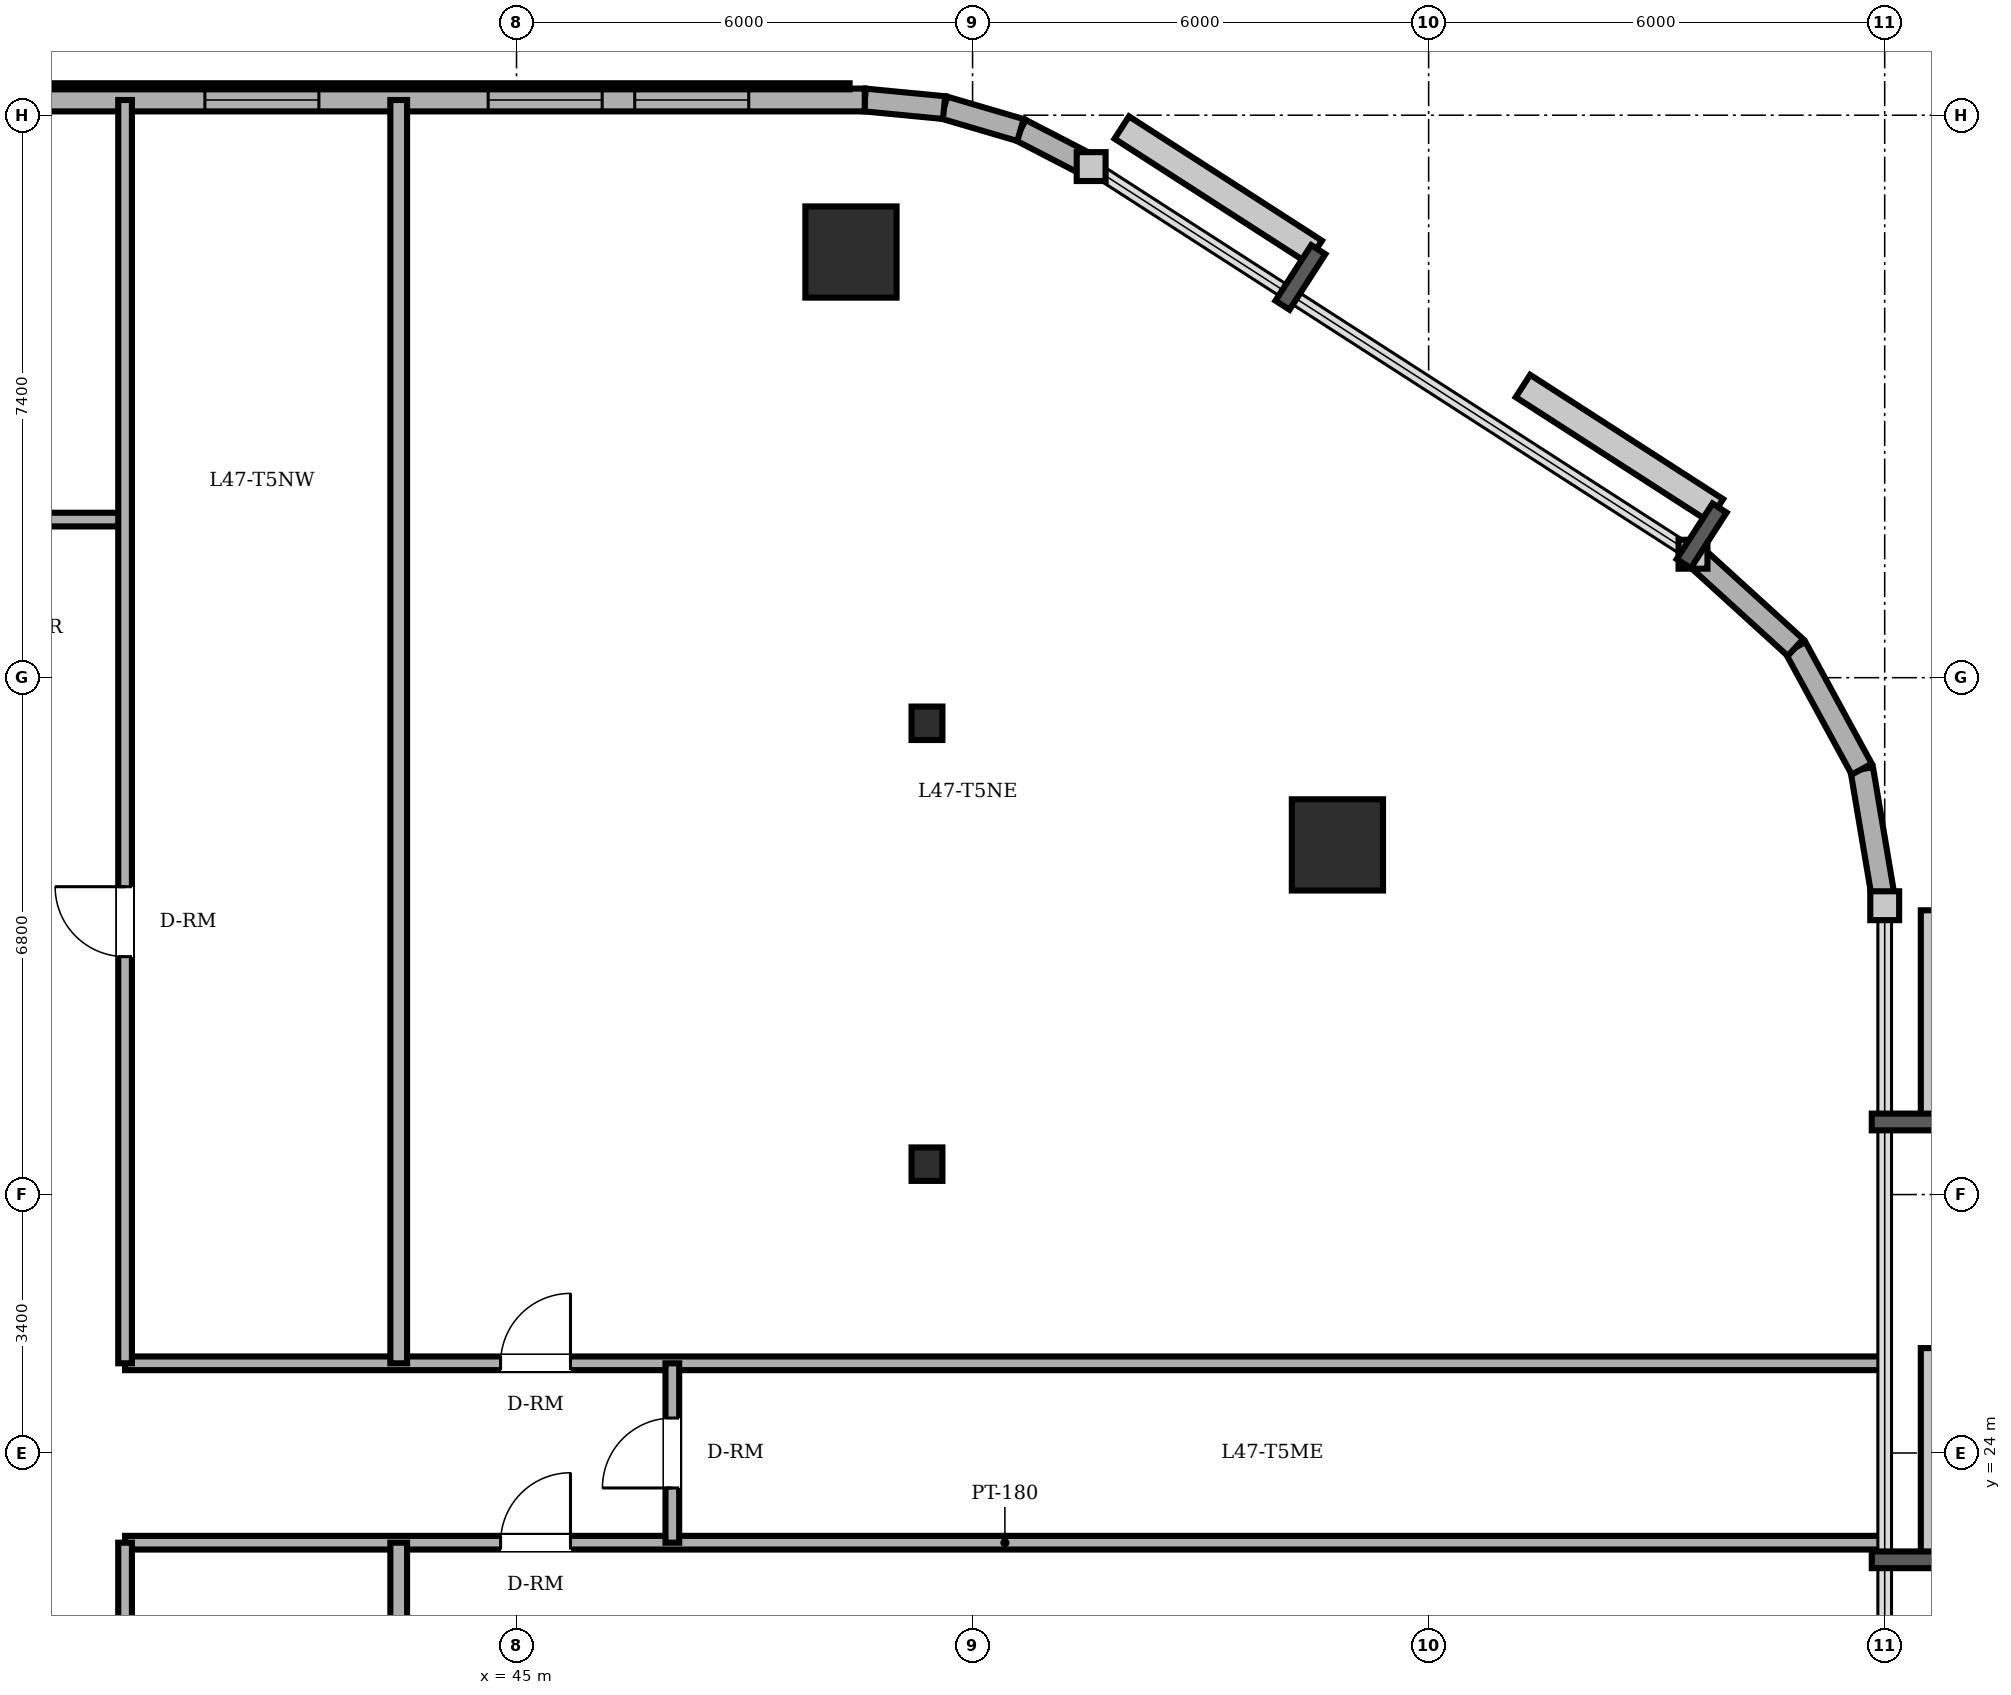
"""IFC4 building model, lengths in metres.
Left out: names, types, materials, properties, quantities, classifications, styles, units other than length and angle.
Written with IfcOpenShell. Run it as: python <this file> out.ifc"""

import sys

from ifc_helpers import new_model, si_unit, direction, frame, frame_2d, origin, origin_2d, place, context, subcontext, project, spatial, rectangle, circle, i_section, extrude, element, fill, save


model = new_model("IFC4")
c1 = context("Model", 3, precision=1e-05, world=origin(), true_north=direction((0.0, 1.0)))
c2 = subcontext(c1, "Body", "Model", "MODEL_VIEW")
j1 = project(units=[si_unit("LENGTHUNIT", "METRE"), si_unit("PLANEANGLEUNIT", "RADIAN")], contexts=[c1])
p1 = place(None, origin())
s1 = spatial("IfcSite", under=j1, at=p1, CompositionType="ELEMENT")
p2 = place(p1, origin())
s2 = spatial("IfcBuilding", under=s1, at=p2, CompositionType="ELEMENT")
p3 = place(p2, frame((0.0, 0.0, 179.8)))
s3 = spatial("IfcBuildingStorey", under=s2, at=p3, CompositionType="ELEMENT", Elevation=179.8)
for number, where, z_axis, x_axis in (
    (1, (55.8, 32.0, 0.0), (0.0, 0.0, 1.0), (1.0, 0.0, 0.0)),
    (2, (49.4, 39.8, 0.0), (0.0, 0.0, 1.0), (1.0, 0.0, 0.0)),
):
    element("IfcColumn", number, at=place(p3, frame(where, z_axis=z_axis, x_axis=x_axis)), inside=s3, PredefinedType="COLUMN", context=c2, shape_type="SweptSolid", body=[
        extrude(circle(Radius=0.6, at=origin_2d()), origin(), (0.0, 0.0, 1.0), 3.6),
    ])
for number, where, z_axis, x_axis in (
    (3, (50.4, 27.8, 0.0), (0.0, 0.0, 1.0), (1.0, 0.0, 0.0)),
    (4, (50.4, 33.6, 0.0), (0.0, 0.0, 1.0), (1.0, 0.0, 0.0)),
):
    element("IfcColumn", number, at=place(p3, frame(where, z_axis=z_axis, x_axis=x_axis)), inside=s3, PredefinedType="COLUMN", context=c2, shape_type="SweptSolid", body=[
        extrude(i_section(OverallWidth=0.406, OverallDepth=0.44, WebThickness=0.024, FlangeThickness=0.039, FilletRadius=0.015, at=origin_2d()), origin(), (0.0, 0.0, 1.0), 3.6),
    ])
p4 = place(p3, frame((63.0, 31.2, 0.0), z_axis=(0.0, 0.0, 1.0), x_axis=(-0.165724081207, 0.986172159873, 0.0)))
e5 = element("IfcWall", 5, at=p4, inside=s3, PredefinedType="SOLIDWALL", context=c2, shape_type="SweptSolid", body=[
    extrude(rectangle(XDim=1.822, YDim=0.3, at=frame_2d((0.911, 0.0))), origin(), (0.0, 0.0, 1.0), 3.4),
])
p5 = place(p3, frame((62.698, 32.997, 0.0), z_axis=(0.0, 0.0, 1.0), x_axis=(-0.478608030646, 0.878028674362, 0.0)))
e6 = element("IfcWall", 6, at=p5, inside=s3, PredefinedType="SOLIDWALL", context=c2, shape_type="SweptSolid", body=[
    extrude(rectangle(XDim=1.822, YDim=0.3, at=frame_2d((0.911, 0.0))), origin(), (0.0, 0.0, 1.0), 3.4),
])
p6 = place(p3, frame((61.826, 34.597, 0.0), z_axis=(0.0, 0.0, 1.0), x_axis=(-0.73947929393, 0.673179302897, 0.0)))
e7 = element("IfcWall", 7, at=p6, inside=s3, PredefinedType="SOLIDWALL", context=c2, shape_type="SweptSolid", body=[
    extrude(rectangle(XDim=1.823, YDim=0.3, at=frame_2d((0.911, 0.0))), origin(), (0.0, 0.0, 1.0), 3.4),
])
p7 = place(p3, frame((52.56, 40.924, 0.0), z_axis=(0.0, 0.0, 1.0), x_axis=(-0.888283247196, 0.459296062198, 0.0)))
e8 = element("IfcWall", 8, at=p7, inside=s3, PredefinedType="SOLIDWALL", context=c2, shape_type="SweptSolid", body=[
    extrude(rectangle(XDim=1.047, YDim=0.3, at=frame_2d((0.523, 0.0))), origin(), (0.0, 0.0, 1.0), 3.4),
])
p8 = place(p3, frame((51.63, 41.405, 0.0), z_axis=(0.0, 0.0, 1.0), x_axis=(-0.959528674476, 0.281610942363, 0.0)))
e9 = element("IfcWall", 9, at=p8, inside=s3, PredefinedType="SOLIDWALL", context=c2, shape_type="SweptSolid", body=[
    extrude(rectangle(XDim=1.047, YDim=0.3, at=frame_2d((0.524, 0.0))), origin(), (0.0, 0.0, 1.0), 3.4),
])
p9 = place(p3, frame((50.625, 41.7, 0.0), z_axis=(0.0, 0.0, 1.0), x_axis=(-0.995426089968, 0.095534807324, 0.0)))
e10 = element("IfcWall", 10, at=p9, inside=s3, PredefinedType="SOLIDWALL", context=c2, shape_type="SweptSolid", body=[
    extrude(rectangle(XDim=1.048, YDim=0.3, at=frame_2d((0.524, 0.0))), origin(), (0.0, 0.0, 1.0), 3.4),
])
p10 = place(p3, frame((49.582, 41.8, 0.0), z_axis=(0.0, 0.0, 1.0), x_axis=(-1.0, 0.0, 0.0)))
e11 = element("IfcWall", 11, at=p10, inside=s3, PredefinedType="SOLIDWALL", context=c2, shape_type="SweptSolid", body=[
    extrude(rectangle(XDim=30.282, YDim=0.3, at=frame_2d((15.141, 0.0))), origin(), (0.0, 0.0, 1.0), 3.4),
])
p11 = place(p10, frame((25.407, 0.0, 0.0)))
e12 = element("IfcOpeningElement", 12, at=p11, cuts=e11, PredefinedType="OPENING", context=c2, shape_type="SweptSolid", body=[
    extrude(rectangle(XDim=0.95, YDim=2.2, at=frame_2d((0.475, 1.1))), frame((0.0, 0.16, 0.0), z_axis=(0.0, -1.0, 0.0), x_axis=(1.0, 0.0, 0.0)), (0.0, 0.0, 1.0), 0.32),
])
p12 = place(p10, frame((1.527, 0.0, 0.85)))
e13 = element("IfcOpeningElement", 13, at=p12, cuts=e11, PredefinedType="OPENING", context=c2, shape_type="SweptSolid", body=[
    extrude(rectangle(XDim=1.5, YDim=1.55, at=frame_2d((0.75, 0.775))), frame((0.0, 0.16, 0.0), z_axis=(0.0, -1.0, 0.0), x_axis=(1.0, 0.0, 0.0)), (0.0, 0.0, 1.0), 0.32),
])
p13 = place(p10, frame((3.455, 0.0, 0.85)))
e14 = element("IfcOpeningElement", 14, at=p13, cuts=e11, PredefinedType="OPENING", context=c2, shape_type="SweptSolid", body=[
    extrude(rectangle(XDim=1.5, YDim=1.55, at=frame_2d((0.75, 0.775))), frame((0.0, 0.16, 0.0), z_axis=(0.0, -1.0, 0.0), x_axis=(1.0, 0.0, 0.0)), (0.0, 0.0, 1.0), 0.32),
])
p14 = place(p10, frame((7.182, 0.0, 0.85)))
e15 = element("IfcOpeningElement", 15, at=p14, cuts=e11, PredefinedType="OPENING", context=c2, shape_type="SweptSolid", body=[
    extrude(rectangle(XDim=1.5, YDim=1.55, at=frame_2d((0.75, 0.775))), frame((0.0, 0.16, 0.0), z_axis=(0.0, -1.0, 0.0), x_axis=(1.0, 0.0, 0.0)), (0.0, 0.0, 1.0), 0.32),
])
p15 = place(p10, frame((11.665, 0.0, 0.85)))
e16 = element("IfcOpeningElement", 16, at=p15, cuts=e11, PredefinedType="OPENING", context=c2, shape_type="SweptSolid", body=[
    extrude(rectangle(XDim=1.5, YDim=1.55, at=frame_2d((0.75, 0.775))), frame((0.0, 0.16, 0.0), z_axis=(0.0, -1.0, 0.0), x_axis=(1.0, 0.0, 0.0)), (0.0, 0.0, 1.0), 0.32),
])
p16 = place(p10, frame((14.349, 0.0, 0.85)))
e17 = element("IfcOpeningElement", 17, at=p16, cuts=e11, PredefinedType="OPENING", context=c2, shape_type="SweptSolid", body=[
    extrude(rectangle(XDim=1.5, YDim=1.55, at=frame_2d((0.75, 0.775))), frame((0.0, 0.16, 0.0), z_axis=(0.0, -1.0, 0.0), x_axis=(1.0, 0.0, 0.0)), (0.0, 0.0, 1.0), 0.32),
])
p17 = place(p10, frame((18.932, 0.0, 0.85)))
e18 = element("IfcOpeningElement", 18, at=p17, cuts=e11, PredefinedType="OPENING", context=c2, shape_type="SweptSolid", body=[
    extrude(rectangle(XDim=1.5, YDim=1.55, at=frame_2d((0.75, 0.775))), frame((0.0, 0.16, 0.0), z_axis=(0.0, -1.0, 0.0), x_axis=(1.0, 0.0, 0.0)), (0.0, 0.0, 1.0), 0.32),
])
p18 = place(p10, frame((22.532, 0.0, 0.85)))
e19 = element("IfcOpeningElement", 19, at=p18, cuts=e11, PredefinedType="OPENING", context=c2, shape_type="SweptSolid", body=[
    extrude(rectangle(XDim=1.5, YDim=1.55, at=frame_2d((0.75, 0.775))), frame((0.0, 0.16, 0.0), z_axis=(0.0, -1.0, 0.0), x_axis=(1.0, 0.0, 0.0)), (0.0, 0.0, 1.0), 0.32),
])
p19 = place(p10, frame((27.532, 0.0, 0.85)))
e20 = element("IfcOpeningElement", 20, at=p19, cuts=e11, PredefinedType="OPENING", context=c2, shape_type="SweptSolid", body=[
    extrude(rectangle(XDim=1.5, YDim=1.55, at=frame_2d((0.75, 0.775))), frame((0.0, 0.16, 0.0), z_axis=(0.0, -1.0, 0.0), x_axis=(1.0, 0.0, 0.0)), (0.0, 0.0, 1.0), 0.32),
])
p20 = place(p3, frame((39.85, 22.82, 0.0), z_axis=(0.0, 0.0, 1.0), x_axis=(1.0, 0.0, 0.0)))
e21 = element("IfcWall", 21, at=p20, inside=s3, PredefinedType="PARTITIONING", context=c2, shape_type="SweptSolid", body=[
    extrude(rectangle(XDim=23.15, YDim=0.18, at=frame_2d((11.575, 0.0))), origin(), (0.0, 0.0, 1.0), 3.4),
])
p21 = place(p20, frame((4.94, 0.0, 0.0)))
e22 = element("IfcOpeningElement", 22, at=p21, cuts=e21, PredefinedType="OPENING", context=c2, shape_type="SweptSolid", body=[
    extrude(rectangle(XDim=0.92, YDim=2.1, at=frame_2d((0.46, 1.05))), frame((0.0, 0.1, 0.0), z_axis=(0.0, -1.0, 0.0), x_axis=(1.0, 0.0, 0.0)), (0.0, 0.0, 1.0), 0.2),
])
p22 = place(p3, frame((39.85, 25.18, 0.0), z_axis=(0.0, 0.0, 1.0), x_axis=(1.0, 0.0, 0.0)))
e23 = element("IfcWall", 23, at=p22, inside=s3, PredefinedType="PARTITIONING", context=c2, shape_type="SweptSolid", body=[
    extrude(rectangle(XDim=23.15, YDim=0.18, at=frame_2d((11.575, 0.0))), origin(), (0.0, 0.0, 1.0), 3.4),
])
p23 = place(p22, frame((4.94, 0.0, 0.0)))
e24 = element("IfcOpeningElement", 24, at=p23, cuts=e23, PredefinedType="OPENING", context=c2, shape_type="SweptSolid", body=[
    extrude(rectangle(XDim=0.92, YDim=2.1, at=frame_2d((0.46, 1.05))), frame((0.0, 0.1, 0.0), z_axis=(0.0, -1.0, 0.0), x_axis=(1.0, 0.0, 0.0)), (0.0, 0.0, 1.0), 0.2),
])
p24 = place(p3, frame((13.8, 36.28, 0.0), z_axis=(0.0, 0.0, 1.0), x_axis=(1.0, 0.0, 0.0)))
e25 = element("IfcWall", 25, at=p24, inside=s3, PredefinedType="PARTITIONING", context=c2, shape_type="SweptSolid", body=[
    extrude(rectangle(XDim=26.05, YDim=0.18, at=frame_2d((13.025, 0.0))), origin(), (0.0, 0.0, 1.0), 3.4),
])
p25 = place(p24, frame((12.05, 0.0, 0.0)))
e26 = element("IfcOpeningElement", 26, at=p25, cuts=e25, PredefinedType="OPENING", context=c2, shape_type="SweptSolid", body=[
    extrude(rectangle(XDim=0.9, YDim=2.1, at=frame_2d((0.45, 1.05))), frame((0.0, 0.1, 0.0), z_axis=(0.0, -1.0, 0.0), x_axis=(1.0, 0.0, 0.0)), (0.0, 0.0, 1.0), 0.2),
])
p26 = place(p24, frame((15.67, 0.0, 0.0)))
e27 = element("IfcOpeningElement", 27, at=p26, cuts=e25, PredefinedType="OPENING", context=c2, shape_type="SweptSolid", body=[
    extrude(rectangle(XDim=0.86, YDim=2.1, at=frame_2d((0.43, 1.05))), frame((0.0, 0.1, 0.0), z_axis=(0.0, -1.0, 0.0), x_axis=(1.0, 0.0, 0.0)), (0.0, 0.0, 1.0), 0.2),
])
p27 = place(p24, frame((5.54, 0.0, 0.0)))
e28 = element("IfcOpeningElement", 28, at=p27, cuts=e25, PredefinedType="OPENING", context=c2, shape_type="SweptSolid", body=[
    extrude(rectangle(XDim=0.92, YDim=2.1, at=frame_2d((0.46, 1.05))), frame((0.0, 0.1, 0.0), z_axis=(0.0, -1.0, 0.0), x_axis=(1.0, 0.0, 0.0)), (0.0, 0.0, 1.0), 0.2),
])
p28 = place(p24, frame((21.305, 0.0, 0.0)))
e29 = element("IfcOpeningElement", 29, at=p28, cuts=e25, PredefinedType="OPENING", context=c2, shape_type="SweptSolid", body=[
    extrude(rectangle(XDim=0.92, YDim=2.1, at=frame_2d((0.46, 1.05))), frame((0.0, 0.1, 0.0), z_axis=(0.0, -1.0, 0.0), x_axis=(1.0, 0.0, 0.0)), (0.0, 0.0, 1.0), 0.2),
])
p29 = place(p3, frame((39.85, 6.2, 0.0), z_axis=(0.0, 0.0, 1.0), x_axis=(0.0, 1.0, 0.0)))
e30 = element("IfcWall", 30, at=p29, inside=s3, PredefinedType="PARTITIONING", context=c2, shape_type="SweptSolid", body=[
    extrude(rectangle(XDim=16.62, YDim=0.18, at=frame_2d((8.31, 0.0))), origin(), (0.0, 0.0, 1.0), 3.4),
])
p30 = place(p29, frame((10.35, 0.0, 0.0)))
e31 = element("IfcOpeningElement", 31, at=p30, cuts=e30, PredefinedType="OPENING", context=c2, shape_type="SweptSolid", body=[
    extrude(rectangle(XDim=0.92, YDim=2.1, at=frame_2d((0.46, 1.05))), frame((0.0, 0.1, 0.0), z_axis=(0.0, -1.0, 0.0), x_axis=(1.0, 0.0, 0.0)), (0.0, 0.0, 1.0), 0.2),
])
p31 = place(p3, frame((39.85, 25.18, 0.0), z_axis=(0.0, 0.0, 1.0), x_axis=(0.0, 1.0, 0.0)))
e32 = element("IfcWall", 32, at=p31, inside=s3, PredefinedType="PARTITIONING", context=c2, shape_type="SweptSolid", body=[
    extrude(rectangle(XDim=16.62, YDim=0.18, at=frame_2d((8.31, 0.0))), origin(), (0.0, 0.0, 1.0), 3.4),
])
p32 = place(p31, frame((5.35, 0.0, 0.0)))
e33 = element("IfcOpeningElement", 33, at=p32, cuts=e32, PredefinedType="OPENING", context=c2, shape_type="SweptSolid", body=[
    extrude(rectangle(XDim=0.92, YDim=2.1, at=frame_2d((0.46, 1.05))), frame((0.0, 0.1, 0.0), z_axis=(0.0, -1.0, 0.0), x_axis=(1.0, 0.0, 0.0)), (0.0, 0.0, 1.0), 0.2),
])
for number, where, z_axis, x_axis in (
    (34, (43.45, 6.2, 0.0), (0.0, 0.0, 1.0), (0.0, 1.0, 0.0)),
    (35, (43.45, 25.18, 0.0), (0.0, 0.0, 1.0), (0.0, 1.0, 0.0)),
):
    element("IfcWall", number, at=place(p3, frame(where, z_axis=z_axis, x_axis=x_axis)), inside=s3, PredefinedType="PARTITIONING", context=c2, shape_type="SweptSolid", body=[
        extrude(rectangle(XDim=16.62, YDim=0.22, at=frame_2d((8.31, 0.0))), origin(), (0.0, 0.0, 1.0), 3.4),
    ])
p33 = place(p3, frame((47.05, 22.82, 0.0), z_axis=(0.0, 0.0, 1.0), x_axis=(0.0, 1.0, 0.0)))
e36 = element("IfcWall", 36, at=p33, inside=s3, PredefinedType="PARTITIONING", context=c2, shape_type="SweptSolid", body=[
    extrude(rectangle(XDim=2.36, YDim=0.18, at=frame_2d((1.18, 0.0))), origin(), (0.0, 0.0, 1.0), 3.4),
])
p34 = place(p33, frame((0.72, 0.0, 0.0)))
e37 = element("IfcOpeningElement", 37, at=p34, cuts=e36, PredefinedType="OPENING", context=c2, shape_type="SweptSolid", body=[
    extrude(rectangle(XDim=0.92, YDim=2.1, at=frame_2d((0.46, 1.05))), frame((0.0, 0.1, 0.0), z_axis=(0.0, -1.0, 0.0), x_axis=(1.0, 0.0, 0.0)), (0.0, 0.0, 1.0), 0.2),
])
p35 = place(p12, origin())
e38 = element("IfcWindow", 38, at=p35, inside=s3, PartitioningType="DOUBLE_PANEL_VERTICAL", PredefinedType="WINDOW", context=c2, shape_type="SweptSolid", body=[
    extrude(rectangle(XDim=1.5, YDim=1.55, at=frame_2d((0.75, 0.775))), frame((0.0, 0.03, 0.0), z_axis=(0.0, -1.0, 0.0), x_axis=(1.0, 0.0, 0.0)), (0.0, 0.0, 1.0), 0.06),
])
fill(e13, e38)
p36 = place(p13, origin())
e39 = element("IfcWindow", 39, at=p36, inside=s3, PartitioningType="DOUBLE_PANEL_VERTICAL", PredefinedType="WINDOW", context=c2, shape_type="SweptSolid", body=[
    extrude(rectangle(XDim=1.5, YDim=1.55, at=frame_2d((0.75, 0.775))), frame((0.0, 0.03, 0.0), z_axis=(0.0, -1.0, 0.0), x_axis=(1.0, 0.0, 0.0)), (0.0, 0.0, 1.0), 0.06),
])
fill(e14, e39)
p37 = place(p14, origin())
e40 = element("IfcWindow", 40, at=p37, inside=s3, PartitioningType="DOUBLE_PANEL_VERTICAL", PredefinedType="WINDOW", context=c2, shape_type="SweptSolid", body=[
    extrude(rectangle(XDim=1.5, YDim=1.55, at=frame_2d((0.75, 0.775))), frame((0.0, 0.03, 0.0), z_axis=(0.0, -1.0, 0.0), x_axis=(1.0, 0.0, 0.0)), (0.0, 0.0, 1.0), 0.06),
])
fill(e15, e40)
p38 = place(p32, origin())
e41 = element("IfcDoor", 41, at=p38, inside=s3, OperationType="SINGLE_SWING_RIGHT", PredefinedType="DOOR", context=c2, shape_type="SweptSolid", body=[
    extrude(rectangle(XDim=0.92, YDim=2.1, at=frame_2d((0.46, 1.05))), frame((0.0, 0.025, 0.0), z_axis=(0.0, -1.0, 0.0), x_axis=(1.0, 0.0, 0.0)), (0.0, 0.0, 1.0), 0.05),
])
fill(e33, e41)
p39 = place(p23, origin())
e42 = element("IfcDoor", 42, at=p39, inside=s3, OperationType="SINGLE_SWING_RIGHT", PredefinedType="DOOR", context=c2, shape_type="SweptSolid", body=[
    extrude(rectangle(XDim=0.92, YDim=2.1, at=frame_2d((0.46, 1.05))), frame((0.0, 0.025, 0.0), z_axis=(0.0, -1.0, 0.0), x_axis=(1.0, 0.0, 0.0)), (0.0, 0.0, 1.0), 0.05),
])
fill(e24, e42)
p40 = place(p34, origin())
e43 = element("IfcDoor", 43, at=p40, inside=s3, OperationType="SINGLE_SWING_LEFT", PredefinedType="DOOR", context=c2, shape_type="SweptSolid", body=[
    extrude(rectangle(XDim=0.92, YDim=2.1, at=frame_2d((0.46, 1.05))), frame((0.0, 0.025, 0.0), z_axis=(0.0, -1.0, 0.0), x_axis=(1.0, 0.0, 0.0)), (0.0, 0.0, 1.0), 0.05),
])
fill(e37, e43)
p41 = place(p21, origin())
e44 = element("IfcDoor", 44, at=p41, inside=s3, OperationType="SINGLE_SWING_RIGHT", PredefinedType="DOOR", context=c2, shape_type="SweptSolid", body=[
    extrude(rectangle(XDim=0.92, YDim=2.1, at=frame_2d((0.46, 1.05))), frame((0.0, 0.025, 0.0), z_axis=(0.0, -1.0, 0.0), x_axis=(1.0, 0.0, 0.0)), (0.0, 0.0, 1.0), 0.05),
])
fill(e22, e44)
save(model, sys.argv[1])
